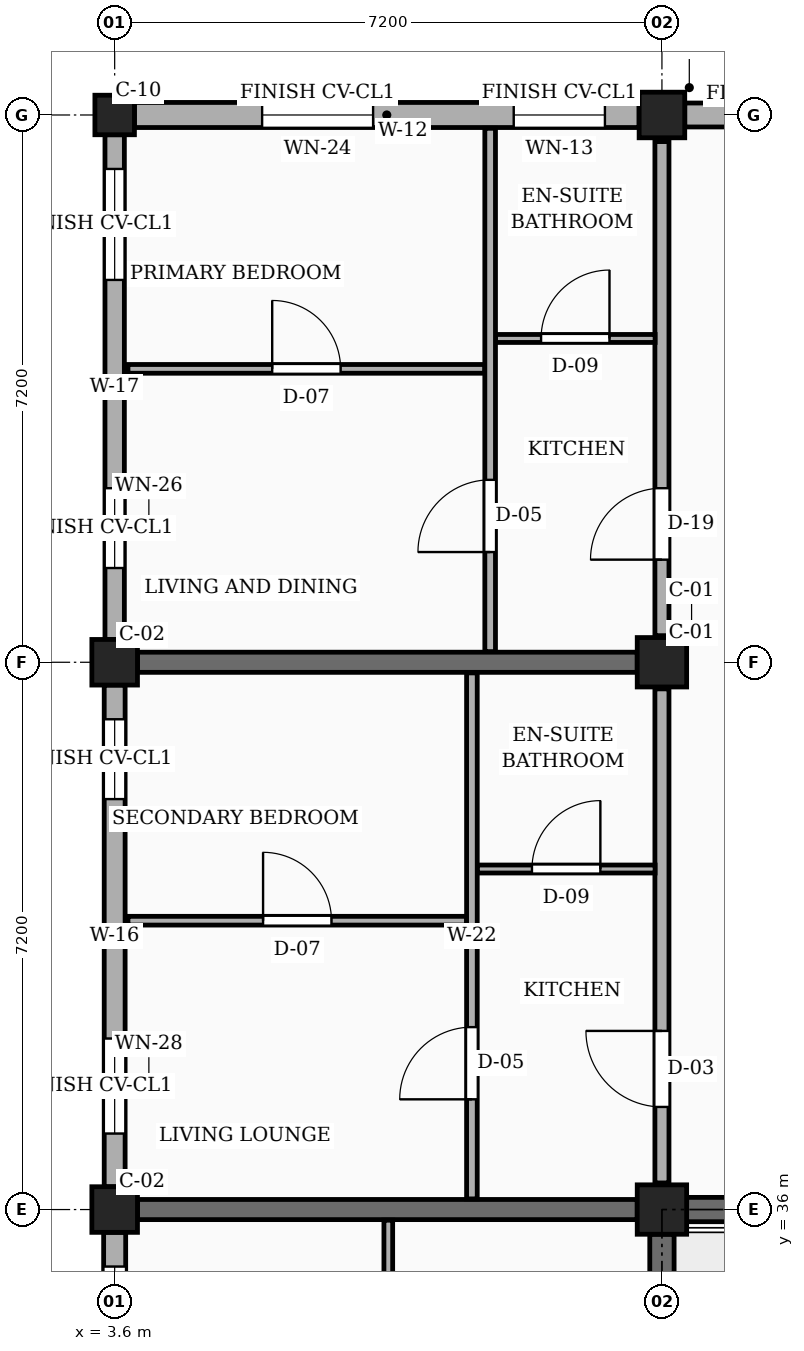
"""IFC4 building model, lengths in metres.
Left out: names, types, materials, properties, quantities, classifications, styles, units other than length and angle.
Written with IfcOpenShell. Run it as: python <this file> out.ifc"""

import sys

from ifc_helpers import new_model, si_unit, direction, frame, frame_2d, origin, origin_2d, place, context, subcontext, project, spatial, rectangle, circle, extrude, element, fill, save


model = new_model("IFC4")
c1 = context("Model", 3, precision=1e-05, world=origin(), true_north=direction((0.0, 1.0)))
c2 = subcontext(c1, "Body", "Model", "MODEL_VIEW")
j1 = project(units=[si_unit("LENGTHUNIT", "METRE"), si_unit("PLANEANGLEUNIT", "RADIAN")], contexts=[c1])
p1 = place(None, origin())
s1 = spatial("IfcSite", under=j1, at=p1, CompositionType="ELEMENT")
p2 = place(p1, origin())
s2 = spatial("IfcBuilding", under=s1, at=p2, CompositionType="ELEMENT")
p3 = place(p2, origin())
s3 = spatial("IfcBuildingStorey", under=s2, at=p3, CompositionType="ELEMENT", Elevation=0.0)
for number, where, z_axis, x_axis in (
    (1, (3.6, 36.0, 0.0), (0.0, 0.0, 1.0), (1.0, 0.0, 0.0)),
    (2, (3.6, 43.2, 0.0), (0.0, 0.0, 1.0), (1.0, 0.0, 0.0)),
):
    element("IfcColumn", number, at=place(p3, frame(where, z_axis=z_axis, x_axis=x_axis)), inside=s3, PredefinedType="COLUMN", context=c2, shape_type="SweptSolid", body=[
        extrude(rectangle(XDim=0.6, YDim=0.6, at=origin_2d()), origin(), (0.0, 0.0, 1.0), 4.5),
    ])
p4 = place(p3, frame((3.6, 50.4, 0.0), z_axis=(0.0, 0.0, 1.0), x_axis=(1.0, 0.0, 0.0)))
e3 = element("IfcColumn", 3, at=p4, inside=s3, PredefinedType="COLUMN", context=c2, shape_type="SweptSolid", body=[
    extrude(circle(Radius=0.26, at=origin_2d()), origin(), (0.0, 0.0, 1.0), 4.5),
])
for number, where, z_axis, x_axis in (
    (4, (10.8, 36.0, 0.0), (0.0, 0.0, 1.0), (1.0, 0.0, 0.0)),
    (5, (10.8, 43.2, 0.0), (0.0, 0.0, 1.0), (1.0, 0.0, 0.0)),
):
    element("IfcColumn", number, at=place(p3, frame(where, z_axis=z_axis, x_axis=x_axis)), inside=s3, PredefinedType="COLUMN", context=c2, shape_type="SweptSolid", body=[
        extrude(rectangle(XDim=0.65, YDim=0.65, at=origin_2d()), origin(), (0.0, 0.0, 1.0), 4.5),
    ])
p5 = place(p3, frame((10.8, 50.4, 0.0), z_axis=(0.0, 0.0, 1.0), x_axis=(1.0, 0.0, 0.0)))
e6 = element("IfcColumn", 6, at=p5, inside=s3, PredefinedType="COLUMN", context=c2, shape_type="SweptSolid", body=[
    extrude(rectangle(XDim=0.6, YDim=0.6, at=origin_2d()), origin(), (0.0, 0.0, 1.0), 4.5),
])
for number, where, z_axis, x_axis in (
    (7, (3.9, 36.0, 0.0), (0.0, 0.0, 1.0), (1.0, 0.0, 0.0)),
    (8, (3.9, 43.2, 0.0), (0.0, 0.0, 1.0), (1.0, 0.0, 0.0)),
):
    element("IfcWall", number, at=place(p3, frame(where, z_axis=z_axis, x_axis=x_axis)), inside=s3, PredefinedType="SOLIDWALL", context=c2, shape_type="SweptSolid", body=[
        extrude(rectangle(XDim=6.575, YDim=0.265, at=frame_2d((3.288, 0.0))), origin(), (0.0, 0.0, 1.0), 3.52),
    ])
p6 = place(p3, frame((17.7, 50.4, 0.0), z_axis=(0.0, 0.0, 1.0), x_axis=(-1.0, 0.0, 0.0)))
e9 = element("IfcWall", 9, at=p6, inside=s3, PredefinedType="SOLIDWALL", context=c2, shape_type="SweptSolid", body=[
    extrude(rectangle(XDim=6.6, YDim=0.315, at=frame_2d((3.3, 0.0))), origin(), (0.0, 0.0, 1.0), 3.79),
])
p7 = place(p6, frame((0.45, 0.0, 0.78)))
e10 = element("IfcOpeningElement", 10, at=p7, cuts=e9, PredefinedType="OPENING", context=c2, shape_type="SweptSolid", body=[
    extrude(rectangle(XDim=1.14, YDim=1.36, at=frame_2d((0.57, 0.68))), frame((0.0, 0.167, 0.0), z_axis=(0.0, -1.0, 0.0), x_axis=(1.0, 0.0, 0.0)), (0.0, 0.0, 1.0), 0.335),
])
p8 = place(p6, frame((4.65, 0.0, 0.78)))
e11 = element("IfcOpeningElement", 11, at=p8, cuts=e9, PredefinedType="OPENING", context=c2, shape_type="SweptSolid", body=[
    extrude(rectangle(XDim=1.3, YDim=1.36, at=frame_2d((0.65, 0.68))), frame((0.0, 0.167, 0.0), z_axis=(0.0, -1.0, 0.0), x_axis=(1.0, 0.0, 0.0)), (0.0, 0.0, 1.0), 0.335),
])
p9 = place(p3, frame((10.5, 50.4, 0.0), z_axis=(0.0, 0.0, 1.0), x_axis=(-1.0, 0.0, 0.0)))
e12 = element("IfcWall", 12, at=p9, inside=s3, PredefinedType="SOLIDWALL", context=c2, shape_type="SweptSolid", body=[
    extrude(rectangle(XDim=6.64, YDim=0.33, at=frame_2d((3.32, 0.0))), origin(), (0.0, 0.0, 1.0), 3.79),
])
p10 = place(p9, frame((0.45, 0.0, 0.78)))
e13 = element("IfcOpeningElement", 13, at=p10, cuts=e12, PredefinedType="OPENING", context=c2, shape_type="SweptSolid", body=[
    extrude(rectangle(XDim=1.2, YDim=1.26, at=frame_2d((0.6, 0.63))), frame((0.0, 0.175, 0.0), z_axis=(0.0, -1.0, 0.0), x_axis=(1.0, 0.0, 0.0)), (0.0, 0.0, 1.0), 0.35),
])
p11 = place(p9, frame((3.5, 0.0, 0.78)))
e14 = element("IfcOpeningElement", 14, at=p11, cuts=e12, PredefinedType="OPENING", context=c2, shape_type="SweptSolid", body=[
    extrude(rectangle(XDim=1.46, YDim=1.36, at=frame_2d((0.73, 0.68))), frame((0.0, 0.175, 0.0), z_axis=(0.0, -1.0, 0.0), x_axis=(1.0, 0.0, 0.0)), (0.0, 0.0, 1.0), 0.35),
])
p12 = place(p3, frame((3.6, 50.14, 0.0), z_axis=(0.0, 0.0, 1.0), x_axis=(0.0, -1.0, 0.0)))
e15 = element("IfcWall", 15, at=p12, inside=s3, PredefinedType="SOLIDWALL", context=c2, shape_type="SweptSolid", body=[
    extrude(rectangle(XDim=6.64, YDim=0.255, at=frame_2d((3.32, 0.0))), origin(), (0.0, 0.0, 1.0), 3.79),
])
p13 = place(p12, frame((0.45, 0.0, 0.78)))
e16 = element("IfcOpeningElement", 16, at=p13, cuts=e15, PredefinedType="OPENING", context=c2, shape_type="SweptSolid", body=[
    extrude(rectangle(XDim=1.46, YDim=1.36, at=frame_2d((0.73, 0.68))), frame((0.0, 0.137, 0.0), z_axis=(0.0, -1.0, 0.0), x_axis=(1.0, 0.0, 0.0)), (0.0, 0.0, 1.0), 0.275),
])
p14 = place(p12, frame((4.65, 0.0, 0.78)))
e17 = element("IfcOpeningElement", 17, at=p14, cuts=e15, PredefinedType="OPENING", context=c2, shape_type="SweptSolid", body=[
    extrude(rectangle(XDim=1.05, YDim=1.44, at=frame_2d((0.525, 0.72))), frame((0.0, 0.137, 0.0), z_axis=(0.0, -1.0, 0.0), x_axis=(1.0, 0.0, 0.0)), (0.0, 0.0, 1.0), 0.275),
])
p15 = place(p3, frame((3.6, 42.9, 0.0), z_axis=(0.0, 0.0, 1.0), x_axis=(0.0, -1.0, 0.0)))
e18 = element("IfcWall", 18, at=p15, inside=s3, PredefinedType="SOLIDWALL", context=c2, shape_type="SweptSolid", body=[
    extrude(rectangle(XDim=6.6, YDim=0.275, at=frame_2d((3.3, 0.0))), origin(), (0.0, 0.0, 1.0), 3.79),
])
p16 = place(p15, frame((0.45, 0.0, 0.78)))
e19 = element("IfcOpeningElement", 19, at=p16, cuts=e18, PredefinedType="OPENING", context=c2, shape_type="SweptSolid", body=[
    extrude(rectangle(XDim=1.05, YDim=1.44, at=frame_2d((0.525, 0.72))), frame((0.0, 0.147, 0.0), z_axis=(0.0, -1.0, 0.0), x_axis=(1.0, 0.0, 0.0)), (0.0, 0.0, 1.0), 0.295),
])
p17 = place(p15, frame((4.65, 0.0, 0.78)))
e20 = element("IfcOpeningElement", 20, at=p17, cuts=e18, PredefinedType="OPENING", context=c2, shape_type="SweptSolid", body=[
    extrude(rectangle(XDim=1.25, YDim=1.44, at=frame_2d((0.625, 0.72))), frame((0.0, 0.147, 0.0), z_axis=(0.0, -1.0, 0.0), x_axis=(1.0, 0.0, 0.0)), (0.0, 0.0, 1.0), 0.295),
])
p18 = place(p3, frame((3.6, 35.7, 0.0), z_axis=(0.0, 0.0, 1.0), x_axis=(0.0, -1.0, 0.0)))
e21 = element("IfcWall", 21, at=p18, inside=s3, PredefinedType="SOLIDWALL", context=c2, shape_type="SweptSolid", body=[
    extrude(rectangle(XDim=6.6, YDim=0.29, at=frame_2d((3.3, 0.0))), origin(), (0.0, 0.0, 1.0), 3.79),
])
p19 = place(p18, frame((0.45, 0.0, 0.78)))
e22 = element("IfcOpeningElement", 22, at=p19, cuts=e21, PredefinedType="OPENING", context=c2, shape_type="SweptSolid", body=[
    extrude(rectangle(XDim=1.25, YDim=1.44, at=frame_2d((0.625, 0.72))), frame((0.0, 0.155, 0.0), z_axis=(0.0, -1.0, 0.0), x_axis=(1.0, 0.0, 0.0)), (0.0, 0.0, 1.0), 0.31),
])
p20 = place(p18, frame((4.65, 0.0, 0.78)))
e23 = element("IfcOpeningElement", 23, at=p20, cuts=e21, PredefinedType="OPENING", context=c2, shape_type="SweptSolid", body=[
    extrude(rectangle(XDim=1.45, YDim=1.44, at=frame_2d((0.725, 0.72))), frame((0.0, 0.155, 0.0), z_axis=(0.0, -1.0, 0.0), x_axis=(1.0, 0.0, 0.0)), (0.0, 0.0, 1.0), 0.31),
])
for number, where, z_axis, x_axis in (
    (24, (10.8, 29.125, 0.0), (0.0, 0.0, 1.0), (0.0, 1.0, 0.0)),
    (25, (11.125, 36.0, 0.0), (0.0, 0.0, 1.0), (1.0, 0.0, 0.0)),
):
    element("IfcWall", number, at=place(p3, frame(where, z_axis=z_axis, x_axis=x_axis)), inside=s3, PredefinedType="SHEAR", context=c2, shape_type="SweptSolid", body=[
        extrude(rectangle(XDim=6.55, YDim=0.32, at=frame_2d((3.275, 0.0))), origin(), (0.0, 0.0, 1.0), 4.22),
    ])
p21 = place(p3, frame((10.8, 36.35, 0.0), z_axis=(0.0, 0.0, 1.0), x_axis=(0.0, 1.0, 0.0)))
e26 = element("IfcWall", 26, at=p21, inside=s3, PredefinedType="PARTITIONING", context=c2, shape_type="SweptSolid", body=[
    extrude(rectangle(XDim=6.5, YDim=0.185, at=frame_2d((3.25, 0.0))), origin(), (0.0, 0.0, 1.0), 3.47),
])
p22 = place(p21, frame((1.0, 0.0, 0.0)))
e27 = element("IfcOpeningElement", 27, at=p22, cuts=e26, PredefinedType="OPENING", context=c2, shape_type="SweptSolid", body=[
    extrude(rectangle(XDim=1.0, YDim=2.15, at=frame_2d((0.5, 1.075))), frame((0.0, 0.103, 0.0), z_axis=(0.0, -1.0, 0.0), x_axis=(1.0, 0.0, 0.0)), (0.0, 0.0, 1.0), 0.205),
])
p23 = place(p3, frame((10.8, 43.55, 0.0), z_axis=(0.0, 0.0, 1.0), x_axis=(0.0, 1.0, 0.0)))
e28 = element("IfcWall", 28, at=p23, inside=s3, PredefinedType="PARTITIONING", context=c2, shape_type="SweptSolid", body=[
    extrude(rectangle(XDim=6.5, YDim=0.185, at=frame_2d((3.25, 0.0))), origin(), (0.0, 0.0, 1.0), 3.47),
])
p24 = place(p23, frame((1.0, 0.0, 0.0)))
e29 = element("IfcOpeningElement", 29, at=p24, cuts=e28, PredefinedType="OPENING", context=c2, shape_type="SweptSolid", body=[
    extrude(rectangle(XDim=0.94, YDim=2.12, at=frame_2d((0.47, 1.06))), frame((0.0, 0.103, 0.0), z_axis=(0.0, -1.0, 0.0), x_axis=(1.0, 0.0, 0.0)), (0.0, 0.0, 1.0), 0.205),
])
p25 = place(p3, frame((7.2, 28.94, 0.0), z_axis=(0.0, 0.0, 1.0), x_axis=(0.0, 1.0, 0.0)))
e30 = element("IfcWall", 30, at=p25, inside=s3, PredefinedType="PARTITIONING", context=c2, shape_type="SweptSolid", body=[
    extrude(rectangle(XDim=6.92, YDim=0.115, at=frame_2d((3.46, 0.0))), origin(), (0.0, 0.0, 1.0), 3.655),
])
p26 = place(p25, frame((1.05, 0.0, 0.0)))
e31 = element("IfcOpeningElement", 31, at=p26, cuts=e30, PredefinedType="OPENING", context=c2, shape_type="SweptSolid", body=[
    extrude(rectangle(XDim=0.87, YDim=2.05, at=frame_2d((0.435, 1.025))), frame((0.0, 0.067, 0.0), z_axis=(0.0, -1.0, 0.0), x_axis=(1.0, 0.0, 0.0)), (0.0, 0.0, 1.0), 0.135),
])
p27 = place(p25, frame((4.45, 0.0, 0.0)))
e32 = element("IfcOpeningElement", 32, at=p27, cuts=e30, PredefinedType="OPENING", context=c2, shape_type="SweptSolid", body=[
    extrude(rectangle(XDim=0.88, YDim=2.08, at=frame_2d((0.44, 1.04))), frame((0.0, 0.067, 0.0), z_axis=(0.0, -1.0, 0.0), x_axis=(1.0, 0.0, 0.0)), (0.0, 0.0, 1.0), 0.135),
])
p28 = place(p3, frame((3.775, 39.8, 0.0), z_axis=(0.0, 0.0, 1.0), x_axis=(1.0, 0.0, 0.0)))
e33 = element("IfcWall", 33, at=p28, inside=s3, PredefinedType="PARTITIONING", context=c2, shape_type="SweptSolid", body=[
    extrude(rectangle(XDim=4.455, YDim=0.115, at=frame_2d((2.228, 0.0))), origin(), (0.0, 0.0, 1.0), 3.655),
])
p29 = place(p28, frame((1.778, 0.0, 0.0)))
e34 = element("IfcOpeningElement", 34, at=p29, cuts=e33, PredefinedType="OPENING", context=c2, shape_type="SweptSolid", body=[
    extrude(rectangle(XDim=0.9, YDim=2.1, at=frame_2d((0.45, 1.05))), frame((0.0, 0.067, 0.0), z_axis=(0.0, -1.0, 0.0), x_axis=(1.0, 0.0, 0.0)), (0.0, 0.0, 1.0), 0.135),
])
p30 = place(p3, frame((8.37, 40.48, 0.0), z_axis=(0.0, 0.0, 1.0), x_axis=(1.0, 0.0, 0.0)))
e35 = element("IfcWall", 35, at=p30, inside=s3, PredefinedType="PARTITIONING", context=c2, shape_type="SweptSolid", body=[
    extrude(rectangle(XDim=2.34, YDim=0.105, at=frame_2d((1.17, 0.0))), origin(), (0.0, 0.0, 1.0), 3.655),
])
p31 = place(p30, frame((0.72, 0.0, 0.0)))
e36 = element("IfcOpeningElement", 36, at=p31, cuts=e35, PredefinedType="OPENING", context=c2, shape_type="SweptSolid", body=[
    extrude(rectangle(XDim=0.9, YDim=2.05, at=frame_2d((0.45, 1.025))), frame((0.0, 0.062, 0.0), z_axis=(0.0, -1.0, 0.0), x_axis=(1.0, 0.0, 0.0)), (0.0, 0.0, 1.0), 0.125),
])
p32 = place(p3, frame((8.3, 36.14, 0.0), z_axis=(0.0, 0.0, 1.0), x_axis=(0.0, 1.0, 0.0)))
e37 = element("IfcWall", 37, at=p32, inside=s3, PredefinedType="PARTITIONING", context=c2, shape_type="SweptSolid", body=[
    extrude(rectangle(XDim=6.92, YDim=0.14, at=frame_2d((3.46, 0.0))), origin(), (0.0, 0.0, 1.0), 3.655),
])
p33 = place(p32, frame((1.31, 0.0, 0.0)))
e38 = element("IfcOpeningElement", 38, at=p33, cuts=e37, PredefinedType="OPENING", context=c2, shape_type="SweptSolid", body=[
    extrude(rectangle(XDim=0.95, YDim=2.1, at=frame_2d((0.475, 1.05))), frame((0.0, 0.08, 0.0), z_axis=(0.0, -1.0, 0.0), x_axis=(1.0, 0.0, 0.0)), (0.0, 0.0, 1.0), 0.16),
])
p34 = place(p3, frame((3.775, 47.06, 0.0), z_axis=(0.0, 0.0, 1.0), x_axis=(1.0, 0.0, 0.0)))
e39 = element("IfcWall", 39, at=p34, inside=s3, PredefinedType="PARTITIONING", context=c2, shape_type="SweptSolid", body=[
    extrude(rectangle(XDim=4.695, YDim=0.115, at=frame_2d((2.348, 0.0))), origin(), (0.0, 0.0, 1.0), 3.655),
])
p35 = place(p34, frame((1.897, 0.0, 0.0)))
e40 = element("IfcOpeningElement", 40, at=p35, cuts=e39, PredefinedType="OPENING", context=c2, shape_type="SweptSolid", body=[
    extrude(rectangle(XDim=0.9, YDim=2.1, at=frame_2d((0.45, 1.05))), frame((0.0, 0.067, 0.0), z_axis=(0.0, -1.0, 0.0), x_axis=(1.0, 0.0, 0.0)), (0.0, 0.0, 1.0), 0.135),
])
p36 = place(p3, frame((8.61, 47.46, 0.0), z_axis=(0.0, 0.0, 1.0), x_axis=(1.0, 0.0, 0.0)))
e41 = element("IfcWall", 41, at=p36, inside=s3, PredefinedType="PARTITIONING", context=c2, shape_type="SweptSolid", body=[
    extrude(rectangle(XDim=2.1, YDim=0.105, at=frame_2d((1.05, 0.0))), origin(), (0.0, 0.0, 1.0), 3.655),
])
p37 = place(p36, frame((0.6, 0.0, 0.0)))
e42 = element("IfcOpeningElement", 42, at=p37, cuts=e41, PredefinedType="OPENING", context=c2, shape_type="SweptSolid", body=[
    extrude(rectangle(XDim=0.9, YDim=2.05, at=frame_2d((0.45, 1.025))), frame((0.0, 0.062, 0.0), z_axis=(0.0, -1.0, 0.0), x_axis=(1.0, 0.0, 0.0)), (0.0, 0.0, 1.0), 0.125),
])
p38 = place(p3, frame((8.54, 43.34, 0.0), z_axis=(0.0, 0.0, 1.0), x_axis=(0.0, 1.0, 0.0)))
e43 = element("IfcWall", 43, at=p38, inside=s3, PredefinedType="PARTITIONING", context=c2, shape_type="SweptSolid", body=[
    extrude(rectangle(XDim=6.885, YDim=0.14, at=frame_2d((3.442, 0.0))), origin(), (0.0, 0.0, 1.0), 3.655),
])
p39 = place(p38, frame((1.31, 0.0, 0.0)))
e44 = element("IfcOpeningElement", 44, at=p39, cuts=e43, PredefinedType="OPENING", context=c2, shape_type="SweptSolid", body=[
    extrude(rectangle(XDim=0.95, YDim=2.1, at=frame_2d((0.475, 1.05))), frame((0.0, 0.08, 0.0), z_axis=(0.0, -1.0, 0.0), x_axis=(1.0, 0.0, 0.0)), (0.0, 0.0, 1.0), 0.16),
])
p40 = place(p10, origin())
e45 = element("IfcWindow", 45, at=p40, inside=s3, PartitioningType="SINGLE_PANEL", PredefinedType="WINDOW", context=c2, shape_type="SweptSolid", body=[
    extrude(rectangle(XDim=1.2, YDim=1.26, at=frame_2d((0.6, 0.63))), frame((0.0, 0.03, 0.0), z_axis=(0.0, -1.0, 0.0), x_axis=(1.0, 0.0, 0.0)), (0.0, 0.0, 1.0), 0.06),
])
fill(e13, e45)
p41 = place(p11, origin())
e46 = element("IfcWindow", 46, at=p41, inside=s3, PartitioningType="SINGLE_PANEL", PredefinedType="WINDOW", context=c2, shape_type="SweptSolid", body=[
    extrude(rectangle(XDim=1.46, YDim=1.36, at=frame_2d((0.73, 0.68))), frame((0.0, 0.03, 0.0), z_axis=(0.0, -1.0, 0.0), x_axis=(1.0, 0.0, 0.0)), (0.0, 0.0, 1.0), 0.06),
])
fill(e14, e46)
p42 = place(p13, origin())
e47 = element("IfcWindow", 47, at=p42, inside=s3, PartitioningType="SINGLE_PANEL", PredefinedType="WINDOW", context=c2, shape_type="SweptSolid", body=[
    extrude(rectangle(XDim=1.46, YDim=1.36, at=frame_2d((0.73, 0.68))), frame((0.0, 0.03, 0.0), z_axis=(0.0, -1.0, 0.0), x_axis=(1.0, 0.0, 0.0)), (0.0, 0.0, 1.0), 0.06),
])
fill(e16, e47)
p43 = place(p14, origin())
e48 = element("IfcWindow", 48, at=p43, inside=s3, PartitioningType="SINGLE_PANEL", PredefinedType="WINDOW", context=c2, shape_type="SweptSolid", body=[
    extrude(rectangle(XDim=1.05, YDim=1.44, at=frame_2d((0.525, 0.72))), frame((0.0, 0.03, 0.0), z_axis=(0.0, -1.0, 0.0), x_axis=(1.0, 0.0, 0.0)), (0.0, 0.0, 1.0), 0.06),
])
fill(e17, e48)
p44 = place(p16, origin())
e49 = element("IfcWindow", 49, at=p44, inside=s3, PartitioningType="SINGLE_PANEL", PredefinedType="WINDOW", context=c2, shape_type="SweptSolid", body=[
    extrude(rectangle(XDim=1.05, YDim=1.44, at=frame_2d((0.525, 0.72))), frame((0.0, 0.03, 0.0), z_axis=(0.0, -1.0, 0.0), x_axis=(1.0, 0.0, 0.0)), (0.0, 0.0, 1.0), 0.06),
])
fill(e19, e49)
p45 = place(p17, origin())
e50 = element("IfcWindow", 50, at=p45, inside=s3, PartitioningType="SINGLE_PANEL", PredefinedType="WINDOW", context=c2, shape_type="SweptSolid", body=[
    extrude(rectangle(XDim=1.25, YDim=1.44, at=frame_2d((0.625, 0.72))), frame((0.0, 0.03, 0.0), z_axis=(0.0, -1.0, 0.0), x_axis=(1.0, 0.0, 0.0)), (0.0, 0.0, 1.0), 0.06),
])
fill(e20, e50)
p46 = place(p19, origin())
e51 = element("IfcWindow", 51, at=p46, inside=s3, PartitioningType="SINGLE_PANEL", PredefinedType="WINDOW", context=c2, shape_type="SweptSolid", body=[
    extrude(rectangle(XDim=1.25, YDim=1.44, at=frame_2d((0.625, 0.72))), frame((0.0, 0.03, 0.0), z_axis=(0.0, -1.0, 0.0), x_axis=(1.0, 0.0, 0.0)), (0.0, 0.0, 1.0), 0.06),
])
fill(e22, e51)
p47 = place(p22, origin())
e52 = element("IfcDoor", 52, at=p47, inside=s3, OperationType="SINGLE_SWING_RIGHT", PredefinedType="DOOR", context=c2, shape_type="SweptSolid", body=[
    extrude(rectangle(XDim=1.0, YDim=2.15, at=frame_2d((0.5, 1.075))), frame((0.0, 0.025, 0.0), z_axis=(0.0, -1.0, 0.0), x_axis=(1.0, 0.0, 0.0)), (0.0, 0.0, 1.0), 0.05),
])
fill(e27, e52)
p48 = place(p24, origin())
e53 = element("IfcDoor", 53, at=p48, inside=s3, OperationType="SINGLE_SWING_LEFT", PredefinedType="DOOR", context=c2, shape_type="SweptSolid", body=[
    extrude(rectangle(XDim=0.94, YDim=2.12, at=frame_2d((0.47, 1.06))), frame((0.0, 0.025, 0.0), z_axis=(0.0, -1.0, 0.0), x_axis=(1.0, 0.0, 0.0)), (0.0, 0.0, 1.0), 0.05),
])
fill(e29, e53)
p49 = place(p29, origin())
e54 = element("IfcDoor", 54, at=p49, inside=s3, OperationType="SINGLE_SWING_LEFT", PredefinedType="DOOR", context=c2, shape_type="SweptSolid", body=[
    extrude(rectangle(XDim=0.9, YDim=2.1, at=frame_2d((0.45, 1.05))), frame((0.0, 0.025, 0.0), z_axis=(0.0, -1.0, 0.0), x_axis=(1.0, 0.0, 0.0)), (0.0, 0.0, 1.0), 0.05),
])
fill(e34, e54)
p50 = place(p31, origin())
e55 = element("IfcDoor", 55, at=p50, inside=s3, OperationType="SINGLE_SWING_RIGHT", PredefinedType="DOOR", context=c2, shape_type="SweptSolid", body=[
    extrude(rectangle(XDim=0.9, YDim=2.05, at=frame_2d((0.45, 1.025))), frame((0.0, 0.025, 0.0), z_axis=(0.0, -1.0, 0.0), x_axis=(1.0, 0.0, 0.0)), (0.0, 0.0, 1.0), 0.05),
])
fill(e36, e55)
p51 = place(p33, origin())
e56 = element("IfcDoor", 56, at=p51, inside=s3, OperationType="SINGLE_SWING_LEFT", PredefinedType="DOOR", context=c2, shape_type="SweptSolid", body=[
    extrude(rectangle(XDim=0.95, YDim=2.1, at=frame_2d((0.475, 1.05))), frame((0.0, 0.025, 0.0), z_axis=(0.0, -1.0, 0.0), x_axis=(1.0, 0.0, 0.0)), (0.0, 0.0, 1.0), 0.05),
])
fill(e38, e56)
p52 = place(p35, origin())
e57 = element("IfcDoor", 57, at=p52, inside=s3, OperationType="SINGLE_SWING_LEFT", PredefinedType="DOOR", context=c2, shape_type="SweptSolid", body=[
    extrude(rectangle(XDim=0.9, YDim=2.1, at=frame_2d((0.45, 1.05))), frame((0.0, 0.025, 0.0), z_axis=(0.0, -1.0, 0.0), x_axis=(1.0, 0.0, 0.0)), (0.0, 0.0, 1.0), 0.05),
])
fill(e40, e57)
p53 = place(p37, origin())
e58 = element("IfcDoor", 58, at=p53, inside=s3, OperationType="SINGLE_SWING_RIGHT", PredefinedType="DOOR", context=c2, shape_type="SweptSolid", body=[
    extrude(rectangle(XDim=0.9, YDim=2.05, at=frame_2d((0.45, 1.025))), frame((0.0, 0.025, 0.0), z_axis=(0.0, -1.0, 0.0), x_axis=(1.0, 0.0, 0.0)), (0.0, 0.0, 1.0), 0.05),
])
fill(e42, e58)
p54 = place(p39, origin())
e59 = element("IfcDoor", 59, at=p54, inside=s3, OperationType="SINGLE_SWING_LEFT", PredefinedType="DOOR", context=c2, shape_type="SweptSolid", body=[
    extrude(rectangle(XDim=0.95, YDim=2.1, at=frame_2d((0.475, 1.05))), frame((0.0, 0.025, 0.0), z_axis=(0.0, -1.0, 0.0), x_axis=(1.0, 0.0, 0.0)), (0.0, 0.0, 1.0), 0.05),
])
fill(e44, e59)
save(model, sys.argv[1])
